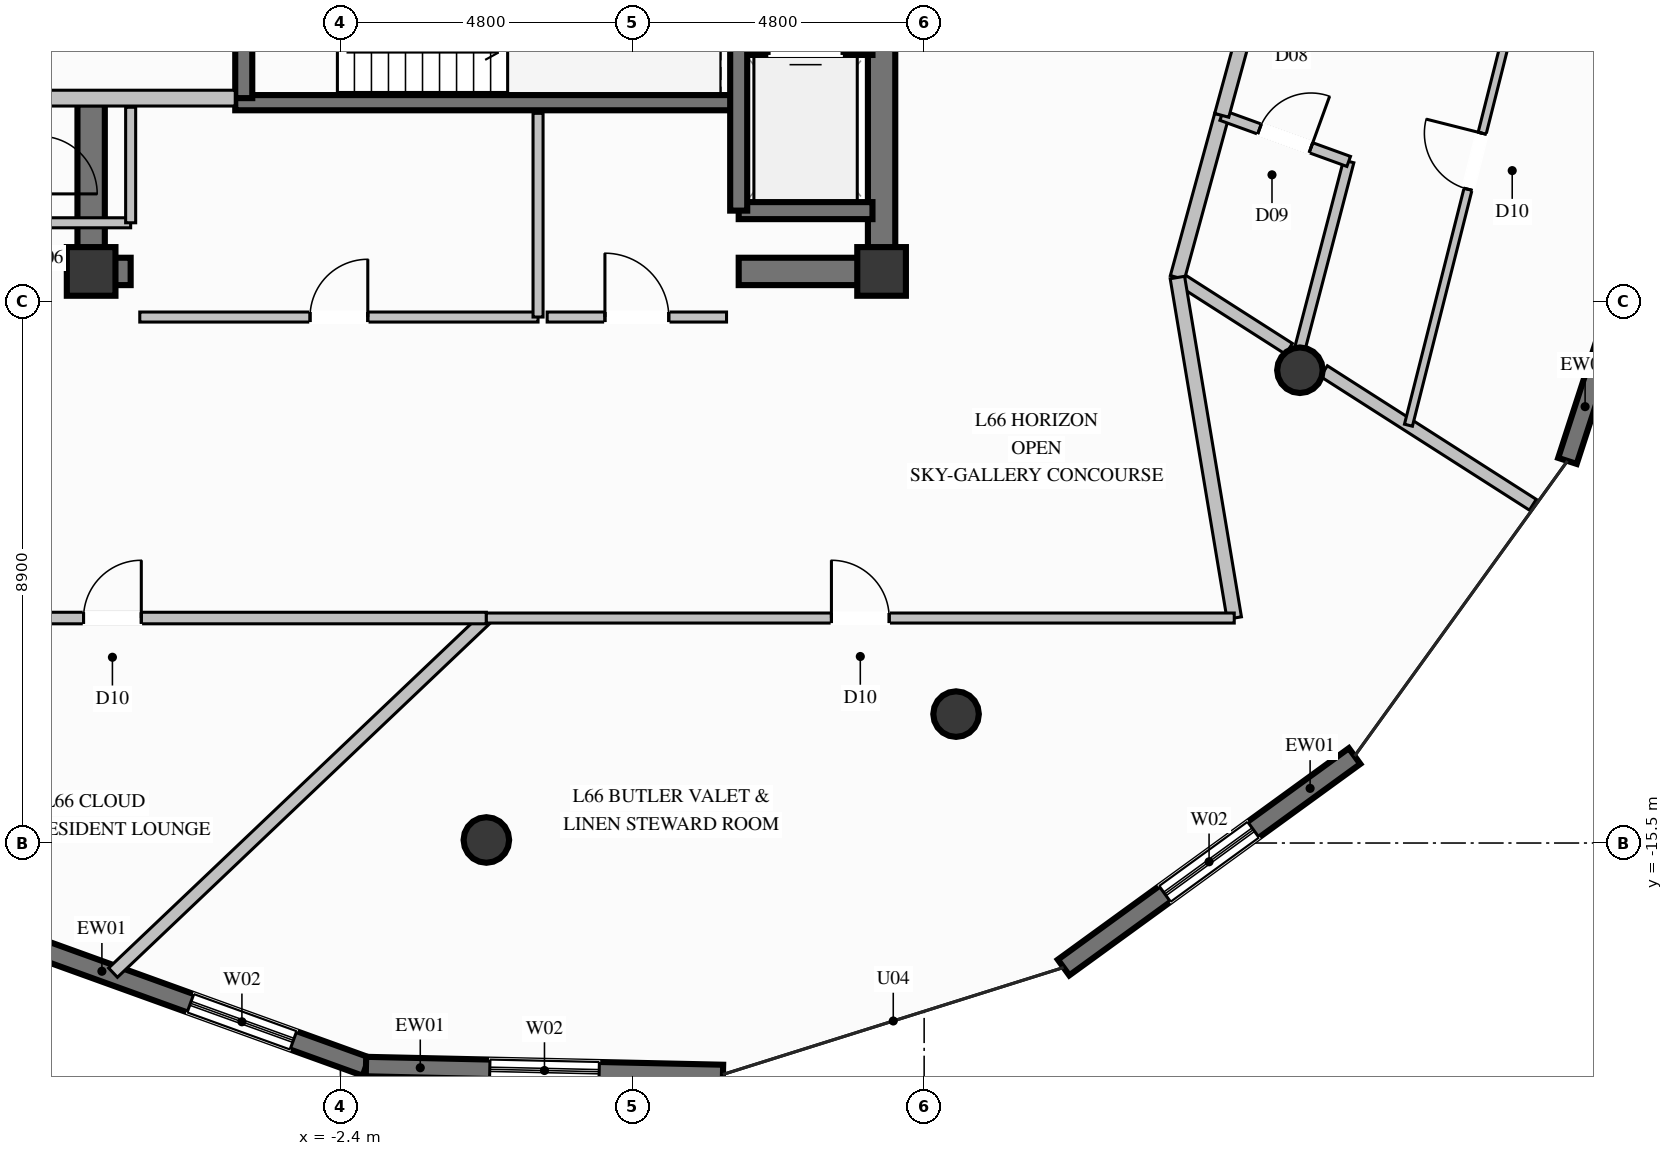
"""IFC4 building model, lengths in metres.
Left out: names, types, materials, properties, quantities, classifications, styles, units other than length and angle.
Written with IfcOpenShell. Run it as: python <this file> out.ifc"""

import sys

from ifc_helpers import new_model, si_unit, direction, frame, frame_2d, origin, origin_2d, place, context, subcontext, project, spatial, rectangle, circle, extrude, element, fill, save


model = new_model("IFC4")
c1 = context("Model", 3, precision=1e-05, world=origin(), true_north=direction((0.0, 1.0)))
c2 = subcontext(c1, "Body", "Model", "MODEL_VIEW")
j1 = project(units=[si_unit("LENGTHUNIT", "METRE"), si_unit("PLANEANGLEUNIT", "RADIAN")], contexts=[c1])
p1 = place(None, origin())
s1 = spatial("IfcSite", under=j1, at=p1, CompositionType="ELEMENT")
p2 = place(p1, origin())
s2 = spatial("IfcBuilding", under=s1, at=p2, CompositionType="ELEMENT")
p3 = place(p2, frame((0.0, 0.0, 254.4)))
s3 = spatial("IfcBuildingStorey", under=s2, at=p3, CompositionType="ELEMENT", Elevation=254.4)
for number, where, z_axis, x_axis in (
    (1, (-6.5, -6.1, 0.0), (0.0, 0.0, 1.0), (1.0, 0.0, 0.0)),
    (2, (6.5, -6.1, 0.0), (0.0, 0.0, 1.0), (1.0, 0.0, 0.0)),
):
    element("IfcColumn", number, at=place(p3, frame(where, z_axis=z_axis, x_axis=x_axis)), inside=s3, PredefinedType="COLUMN", context=c2, shape_type="SweptSolid", body=[
        extrude(rectangle(XDim=0.8, YDim=0.8, at=origin_2d()), origin(), (0.0, 0.0, 1.0), 3.8),
    ])
p4 = place(p3, frame((-4.13, -3.325, 0.0), z_axis=(0.0, 0.0, 1.0), x_axis=(1.0, 0.0, 0.0)))
e3 = element("IfcWall", 3, at=p4, inside=s3, PredefinedType="SOLIDWALL", context=c2, shape_type="SweptSolid", body=[
    extrude(rectangle(XDim=8.26, YDim=0.25, at=frame_2d((4.13, 0.0))), origin(), (0.0, 0.0, 1.0), 3.8),
])
p5 = place(p3, frame((-6.275, -6.1, 0.0), z_axis=(0.0, 0.0, 1.0), x_axis=(1.0, 0.0, 0.0)))
e4 = element("IfcWall", 4, at=p5, inside=s3, PredefinedType="SHEAR", context=c2, shape_type="SweptSolid", body=[
    extrude(rectangle(XDim=0.425, YDim=0.45, at=frame_2d((0.212, 0.0))), origin(), (0.0, 0.0, 1.0), 3.8),
])
p6 = place(p3, frame((4.15, -6.1, 0.0), z_axis=(0.0, 0.0, 1.0), x_axis=(1.0, 0.0, 0.0)))
e5 = element("IfcWall", 5, at=p6, inside=s3, PredefinedType="SHEAR", context=c2, shape_type="SweptSolid", body=[
    extrude(rectangle(XDim=2.125, YDim=0.45, at=frame_2d((1.062, 0.0))), origin(), (0.0, 0.0, 1.0), 3.8),
])
p7 = place(p3, frame((-6.5, -6.325, 0.0), z_axis=(0.0, 0.0, 1.0), x_axis=(0.0, 1.0, 0.0)))
e6 = element("IfcWall", 6, at=p7, inside=s3, PredefinedType="SHEAR", context=c2, shape_type="SweptSolid", body=[
    extrude(rectangle(XDim=2.975, YDim=0.45, at=frame_2d((1.487, 0.0))), origin(), (0.0, 0.0, 1.0), 3.8),
])
p8 = place(p3, frame((6.5, -6.325, 0.0), z_axis=(0.0, 0.0, 1.0), x_axis=(0.0, 1.0, 0.0)))
e7 = element("IfcWall", 7, at=p8, inside=s3, PredefinedType="SHEAR", context=c2, shape_type="SweptSolid", body=[
    extrude(rectangle(XDim=3.975, YDim=0.45, at=frame_2d((1.987, 0.0))), origin(), (0.0, 0.0, 1.0), 3.8),
])
for number, where, z_axis, x_axis in (
    (8, (0.0, -15.45, 0.0), (0.0, 0.0, 1.0), (1.0, 0.0, 0.0)),
    (9, (7.725, -13.38, 0.0), (0.0, 0.0, 1.0), (1.0, 0.0, 0.0)),
    (10, (13.38, -7.725, 0.0), (0.0, 0.0, 1.0), (1.0, 0.0, 0.0)),
):
    element("IfcColumn", number, at=place(p3, frame(where, z_axis=z_axis, x_axis=x_axis)), inside=s3, PredefinedType="COLUMN", context=c2, shape_type="SweptSolid", body=[
        extrude(circle(Radius=0.375, at=origin_2d()), origin(), (0.0, 0.0, 1.0), 3.8),
    ])
p9 = place(p3, frame((14.279, -14.07, 0.0), z_axis=(0.0, 0.0, 1.0), x_axis=(-0.809039360343, -0.587754466946, 0.0)))
e11 = element("IfcWall", 11, at=p9, inside=s3, PredefinedType="SOLIDWALL", context=c2, shape_type="SweptSolid", body=[
    extrude(rectangle(XDim=5.916, YDim=0.32, at=frame_2d((2.958, 0.0))), origin(), (0.0, 0.0, 1.0), 3.57),
])
p10 = place(p9, frame((2.058, 0.0, 0.35)))
e12 = element("IfcOpeningElement", 12, at=p10, cuts=e11, PredefinedType="OPENING", context=c2, shape_type="SweptSolid", body=[
    extrude(rectangle(XDim=1.8, YDim=2.6, at=frame_2d((0.9, 1.3))), frame((0.0, 0.17, 0.0), z_axis=(0.0, -1.0, 0.0), x_axis=(1.0, 0.0, 0.0)), (0.0, 0.0, 1.0), 0.34),
])
p11 = place(p3, frame((19.652, -3.46, 0.0), z_axis=(0.0, 0.0, 1.0), x_axis=(-0.30928580051, -0.950969133885, 0.0)))
e13 = element("IfcWall", 13, at=p11, inside=s3, PredefinedType="SOLIDWALL", context=c2, shape_type="SweptSolid", body=[
    extrude(rectangle(XDim=6.053, YDim=0.32, at=frame_2d((3.026, 0.0))), origin(), (0.0, 0.0, 1.0), 3.57),
])
p12 = place(p11, frame((2.126, 0.0, 0.35)))
e14 = element("IfcOpeningElement", 14, at=p12, cuts=e13, PredefinedType="OPENING", context=c2, shape_type="SweptSolid", body=[
    extrude(rectangle(XDim=1.8, YDim=2.6, at=frame_2d((0.9, 1.3))), frame((0.0, 0.17, 0.0), z_axis=(0.0, -1.0, 0.0), x_axis=(1.0, 0.0, 0.0)), (0.0, 0.0, 1.0), 0.34),
])
p13 = place(p3, frame((-1.98, -19.176, 0.0), z_axis=(0.0, 0.0, 1.0), x_axis=(-0.940616145843, 0.339472040349, 0.0)))
e15 = element("IfcWall", 15, at=p13, inside=s3, PredefinedType="SOLIDWALL", context=c2, shape_type="SweptSolid", body=[
    extrude(rectangle(XDim=5.915, YDim=0.32, at=frame_2d((2.958, 0.0))), origin(), (0.0, 0.0, 1.0), 3.57),
])
p14 = place(p13, frame((1.269, 0.0, 0.35)))
e16 = element("IfcOpeningElement", 16, at=p14, cuts=e15, PredefinedType="OPENING", context=c2, shape_type="SweptSolid", body=[
    extrude(rectangle(XDim=1.8, YDim=2.6, at=frame_2d((0.9, 1.3))), frame((0.0, 0.17, 0.0), z_axis=(0.0, -1.0, 0.0), x_axis=(1.0, 0.0, 0.0)), (0.0, 0.0, 1.0), 0.34),
])
p15 = place(p3, frame((3.891, -19.306, 0.0), z_axis=(0.0, 0.0, 1.0), x_axis=(-0.999755389007, 0.022117010435, 0.0)))
e17 = element("IfcWall", 17, at=p15, inside=s3, PredefinedType="SOLIDWALL", context=c2, shape_type="SweptSolid", body=[
    extrude(rectangle(XDim=5.873, YDim=0.32, at=frame_2d((2.936, 0.0))), origin(), (0.0, 0.0, 1.0), 3.57),
])
p16 = place(p15, frame((2.036, 0.0, 0.35)))
e18 = element("IfcOpeningElement", 18, at=p16, cuts=e17, PredefinedType="OPENING", context=c2, shape_type="SweptSolid", body=[
    extrude(rectangle(XDim=1.8, YDim=2.6, at=frame_2d((0.9, 1.3))), frame((0.0, 0.17, 0.0), z_axis=(0.0, -1.0, 0.0), x_axis=(1.0, 0.0, 0.0)), (0.0, 0.0, 1.0), 0.34),
])
p17 = place(p3, frame((4.15, -5.1, 0.0), z_axis=(0.0, 0.0, 1.0), x_axis=(1.0, 0.0, 0.0)))
e19 = element("IfcWall", 19, at=p17, inside=s3, PredefinedType="SOLIDWALL", context=c2, shape_type="SweptSolid", body=[
    extrude(rectangle(XDim=2.2, YDim=0.28, at=frame_2d((1.1, 0.0))), origin(), (0.0, 0.0, 1.0), 3.57),
])
p18 = place(p3, frame((6.35, -2.4, 0.0), z_axis=(0.0, 0.0, 1.0), x_axis=(-1.0, 0.0, 0.0)))
e20 = element("IfcWall", 20, at=p18, inside=s3, PredefinedType="SOLIDWALL", context=c2, shape_type="SweptSolid", body=[
    extrude(rectangle(XDim=2.2, YDim=0.28, at=frame_2d((1.1, 0.0))), origin(), (0.0, 0.0, 1.0), 3.57),
])
p19 = place(p18, frame((0.5, 0.0, 0.0)))
e21 = element("IfcOpeningElement", 21, at=p19, cuts=e20, PredefinedType="OPENING", context=c2, shape_type="SweptSolid", body=[
    extrude(rectangle(XDim=1.2, YDim=2.2, at=frame_2d((0.6, 1.1))), frame((0.0, 0.15, 0.0), z_axis=(0.0, -1.0, 0.0), x_axis=(1.0, 0.0, 0.0)), (0.0, 0.0, 1.0), 0.3),
])
p20 = place(p3, frame((4.15, -2.4, 0.0), z_axis=(0.0, 0.0, 1.0), x_axis=(0.0, -1.0, 0.0)))
e22 = element("IfcWall", 22, at=p20, inside=s3, PredefinedType="SOLIDWALL", context=c2, shape_type="SweptSolid", body=[
    extrude(rectangle(XDim=2.7, YDim=0.28, at=frame_2d((1.35, 0.0))), origin(), (0.0, 0.0, 1.0), 3.57),
])
p21 = place(p3, frame((-3.99, -3.25, 0.0), z_axis=(0.0, 0.0, 1.0), x_axis=(0.0, 1.0, 0.0)))
e23 = element("IfcWall", 23, at=p21, inside=s3, PredefinedType="SOLIDWALL", context=c2, shape_type="SweptSolid", body=[
    extrude(rectangle(XDim=5.46, YDim=0.28, at=frame_2d((2.73, 0.0))), origin(), (0.0, 0.0, 1.0), 3.57),
])
p22 = place(p21, frame((0.937, 0.0, 0.0)))
e24 = element("IfcOpeningElement", 24, at=p22, cuts=e23, PredefinedType="OPENING", context=c2, shape_type="SweptSolid", body=[
    extrude(rectangle(XDim=1.2, YDim=2.2, at=frame_2d((0.6, 1.1))), frame((0.0, 0.15, 0.0), z_axis=(0.0, -1.0, 0.0), x_axis=(1.0, 0.0, 0.0)), (0.0, 0.0, 1.0), 0.3),
])
p23 = place(p3, frame((-7.225, -3.25, 0.0), z_axis=(0.0, 0.0, 1.0), x_axis=(1.0, 0.0, 0.0)))
e25 = element("IfcWall", 25, at=p23, inside=s3, PredefinedType="PARTITIONING", context=c2, shape_type="SweptSolid", body=[
    extrude(rectangle(XDim=3.095, YDim=0.26, at=frame_2d((1.548, 0.0))), origin(), (0.0, 0.0, 1.0), 3.57),
])
p24 = place(p3, frame((-7.35, -5.3, 0.0), z_axis=(0.0, 0.0, 1.0), x_axis=(1.0, 0.0, 0.0)))
e26 = element("IfcWall", 26, at=p24, inside=s3, PredefinedType="PARTITIONING", context=c2, shape_type="SweptSolid", body=[
    extrude(rectangle(XDim=1.5, YDim=0.165, at=frame_2d((0.75, 0.0))), origin(), (0.0, 0.0, 1.0), 2.655),
])
p25 = place(p3, frame((-5.85, -5.3, 0.0), z_axis=(0.0, 0.0, 1.0), x_axis=(0.0, 1.0, 0.0)))
e27 = element("IfcWall", 27, at=p25, inside=s3, PredefinedType="PARTITIONING", context=c2, shape_type="SweptSolid", body=[
    extrude(rectangle(XDim=1.9, YDim=0.165, at=frame_2d((0.95, 0.0))), origin(), (0.0, 0.0, 1.0), 2.655),
])
p26 = place(p3, frame((-5.7, -6.85, 0.0), z_axis=(0.0, 0.0, 1.0), x_axis=(1.0, 0.0, 0.0)))
e28 = element("IfcWall", 28, at=p26, inside=s3, PredefinedType="PARTITIONING", context=c2, shape_type="SweptSolid", body=[
    extrude(rectangle(XDim=6.55, YDim=0.165, at=frame_2d((3.275, 0.0))), origin(), (0.0, 0.0, 1.0), 2.655),
])
p27 = place(p26, frame((2.8, 0.0, 0.0)))
e29 = element("IfcOpeningElement", 29, at=p27, cuts=e28, PredefinedType="OPENING", context=c2, shape_type="SweptSolid", body=[
    extrude(rectangle(XDim=0.95, YDim=2.1, at=frame_2d((0.475, 1.05))), frame((0.0, 0.093, 0.0), z_axis=(0.0, -1.0, 0.0), x_axis=(1.0, 0.0, 0.0)), (0.0, 0.0, 1.0), 0.185),
])
p28 = place(p3, frame((0.85, -6.85, 0.0), z_axis=(0.0, 0.0, 1.0), x_axis=(0.0, 1.0, 0.0)))
e30 = element("IfcWall", 30, at=p28, inside=s3, PredefinedType="PARTITIONING", context=c2, shape_type="SweptSolid", body=[
    extrude(rectangle(XDim=3.35, YDim=0.165, at=frame_2d((1.675, 0.0))), origin(), (0.0, 0.0, 1.0), 3.57),
])
p29 = place(p3, frame((1.0, -6.85, 0.0), z_axis=(0.0, 0.0, 1.0), x_axis=(1.0, 0.0, 0.0)))
e31 = element("IfcWall", 31, at=p29, inside=s3, PredefinedType="PARTITIONING", context=c2, shape_type="SweptSolid", body=[
    extrude(rectangle(XDim=2.95, YDim=0.165, at=frame_2d((1.475, 0.0))), origin(), (0.0, 0.0, 1.0), 2.655),
])
p30 = place(p29, frame((0.95, 0.0, 0.0)))
e32 = element("IfcOpeningElement", 32, at=p30, cuts=e31, PredefinedType="OPENING", context=c2, shape_type="SweptSolid", body=[
    extrude(rectangle(XDim=1.05, YDim=2.15, at=frame_2d((0.525, 1.075))), frame((0.0, 0.093, 0.0), z_axis=(0.0, -1.0, 0.0), x_axis=(1.0, 0.0, 0.0)), (0.0, 0.0, 1.0), 0.185),
])
p31 = place(p3, frame((11.365, -6.2, 0.0), z_axis=(0.0, 0.0, 1.0), x_axis=(0.842537994554, -0.538636916422, 0.0)))
e33 = element("IfcWall", 33, at=p31, inside=s3, PredefinedType="PARTITIONING", context=c2, shape_type="SweptSolid", body=[
    extrude(rectangle(XDim=2.178, YDim=0.21, at=frame_2d((1.089, 0.0))), origin(), (0.0, 0.0, 1.0), 3.011),
])
p32 = place(p3, frame((13.775, -7.74, 0.0), z_axis=(0.0, 0.0, 1.0), x_axis=(0.842498543439, -0.538698621033, 0.0)))
e34 = element("IfcWall", 34, at=p32, inside=s3, PredefinedType="PARTITIONING", context=c2, shape_type="SweptSolid", body=[
    extrude(rectangle(XDim=4.078, YDim=0.21, at=frame_2d((2.039, 0.0))), origin(), (0.0, 0.0, 1.0), 3.57),
])
p33 = place(p3, frame((11.365, -6.2, 0.0), z_axis=(0.0, 0.0, 1.0), x_axis=(0.263670269996, 0.964612869871, 0.0)))
e35 = element("IfcWall", 35, at=p33, inside=s3, PredefinedType="PARTITIONING", context=c2, shape_type="SweptSolid", body=[
    extrude(rectangle(XDim=2.765, YDim=0.24, at=frame_2d((1.382, 0.0))), origin(), (0.0, 0.0, 1.0), 3.57),
])
p34 = place(p3, frame((13.353, -7.471, 0.0), z_axis=(0.0, 0.0, 1.0), x_axis=(0.252225310896, 0.967668534439, 0.0)))
e36 = element("IfcWall", 36, at=p34, inside=s3, PredefinedType="PLUMBINGWALL", context=c2, shape_type="SweptSolid", body=[
    extrude(rectangle(XDim=3.286, YDim=0.175, at=frame_2d((1.643, 0.0))), origin(), (0.0, 0.0, 1.0), 3.138),
])
p35 = place(p3, frame((12.094, -3.533, 0.0), z_axis=(0.0, 0.0, 1.0), x_axis=(0.93996338917, -0.341275295062, 0.0)))
e37 = element("IfcWall", 37, at=p35, inside=s3, PredefinedType="PLUMBINGWALL", context=c2, shape_type="SweptSolid", body=[
    extrude(rectangle(XDim=2.221, YDim=0.175, at=frame_2d((1.111, 0.0))), origin(), (0.0, 0.0, 1.0), 3.57),
])
p36 = place(p35, frame((0.661, 0.0, 0.0)))
e38 = element("IfcOpeningElement", 38, at=p36, cuts=e37, PredefinedType="OPENING", context=c2, shape_type="SweptSolid", body=[
    extrude(rectangle(XDim=0.9, YDim=2.1, at=frame_2d((0.45, 1.05))), frame((0.0, 0.098, 0.0), z_axis=(0.0, -1.0, 0.0), x_axis=(1.0, 0.0, 0.0)), (0.0, 0.0, 1.0), 0.195),
])
p37 = place(p3, frame((12.094, -3.533, 0.0), z_axis=(0.0, 0.0, 1.0), x_axis=(0.263528615014, 0.964651579104, 0.0)))
e39 = element("IfcWall", 39, at=p37, inside=s3, PredefinedType="PARTITIONING", context=c2, shape_type="SweptSolid", body=[
    extrude(rectangle(XDim=3.818, YDim=0.24, at=frame_2d((1.909, 0.0))), origin(), (0.0, 0.0, 1.0), 3.57),
])
p38 = place(p37, frame((1.359, 0.0, 0.0)))
e40 = element("IfcOpeningElement", 40, at=p38, cuts=e39, PredefinedType="OPENING", context=c2, shape_type="SweptSolid", body=[
    extrude(rectangle(XDim=1.1, YDim=2.3, at=frame_2d((0.55, 1.15))), frame((0.0, 0.13, 0.0), z_axis=(0.0, -1.0, 0.0), x_axis=(1.0, 0.0, 0.0)), (0.0, 0.0, 1.0), 0.26),
])
p39 = place(p3, frame((15.165, -8.629, 0.0), z_axis=(0.0, 0.0, 1.0), x_axis=(0.244710102304, 0.969596290128, 0.0)))
e41 = element("IfcWall", 41, at=p39, inside=s3, PredefinedType="PARTITIONING", context=c2, shape_type="SweptSolid", body=[
    extrude(rectangle(XDim=8.953, YDim=0.135, at=frame_2d((4.477, 0.0))), origin(), (0.0, 0.0, 1.0), 3.57),
])
p40 = place(p39, frame((4.002, 0.0, 0.0)))
e42 = element("IfcOpeningElement", 42, at=p40, cuts=e41, PredefinedType="OPENING", context=c2, shape_type="SweptSolid", body=[
    extrude(rectangle(XDim=0.95, YDim=2.1, at=frame_2d((0.475, 1.05))), frame((0.0, 0.078, 0.0), z_axis=(0.0, -1.0, 0.0), x_axis=(1.0, 0.0, 0.0)), (0.0, 0.0, 1.0), 0.155),
])
p41 = place(p3, frame((0.0, -11.8, 0.0), z_axis=(0.0, 0.0, 1.0), x_axis=(-0.725050537947, -0.688695663862, 0.0)))
e43 = element("IfcWall", 43, at=p41, inside=s3, PredefinedType="PARTITIONING", context=c2, shape_type="SweptSolid", body=[
    extrude(rectangle(XDim=8.468, YDim=0.21, at=frame_2d((4.234, 0.0))), origin(), (0.0, 0.0, 1.0), 3.57),
])
p42 = place(p3, frame((-12.3, -11.8, 0.0), z_axis=(0.0, 0.0, 1.0), x_axis=(1.0, 0.0, 0.0)))
e44 = element("IfcWall", 44, at=p42, inside=s3, PredefinedType="PARTITIONING", context=c2, shape_type="SweptSolid", body=[
    extrude(rectangle(XDim=12.3, YDim=0.19, at=frame_2d((6.15, 0.0))), origin(), (0.0, 0.0, 1.0), 3.57),
])
p43 = place(p42, frame((5.675, 0.0, 0.0)))
e45 = element("IfcOpeningElement", 45, at=p43, cuts=e44, PredefinedType="OPENING", context=c2, shape_type="SweptSolid", body=[
    extrude(rectangle(XDim=0.95, YDim=2.1, at=frame_2d((0.475, 1.05))), frame((0.0, 0.105, 0.0), z_axis=(0.0, -1.0, 0.0), x_axis=(1.0, 0.0, 0.0)), (0.0, 0.0, 1.0), 0.21),
])
p44 = place(p3, frame((12.3, -11.8, 0.0), z_axis=(0.0, 0.0, 1.0), x_axis=(-0.164691848211, 0.986345068996, 0.0)))
e46 = element("IfcWall", 46, at=p44, inside=s3, PredefinedType="PARTITIONING", context=c2, shape_type="SweptSolid", body=[
    extrude(rectangle(XDim=5.678, YDim=0.24, at=frame_2d((2.839, 0.0))), origin(), (0.0, 0.0, 1.0), 3.57),
])
p45 = place(p3, frame((0.0, -11.8, 0.0), z_axis=(0.0, 0.0, 1.0), x_axis=(1.0, 0.0, 0.0)))
e47 = element("IfcWall", 47, at=p45, inside=s3, PredefinedType="PARTITIONING", context=c2, shape_type="SweptSolid", body=[
    extrude(rectangle(XDim=12.3, YDim=0.165, at=frame_2d((6.15, 0.0))), origin(), (0.0, 0.0, 1.0), 3.57),
])
p46 = place(p45, frame((5.675, 0.0, 0.0)))
e48 = element("IfcOpeningElement", 48, at=p46, cuts=e47, PredefinedType="OPENING", context=c2, shape_type="SweptSolid", body=[
    extrude(rectangle(XDim=0.95, YDim=2.1, at=frame_2d((0.475, 1.05))), frame((0.0, 0.093, 0.0), z_axis=(0.0, -1.0, 0.0), x_axis=(1.0, 0.0, 0.0)), (0.0, 0.0, 1.0), 0.185),
])
p47 = place(p10, origin())
e49 = element("IfcWindow", 49, at=p47, inside=s3, PartitioningType="SINGLE_PANEL", PredefinedType="WINDOW", context=c2, shape_type="SweptSolid", body=[
    extrude(rectangle(XDim=1.8, YDim=2.6, at=frame_2d((0.9, 1.3))), frame((0.0, 0.03, 0.0), z_axis=(0.0, -1.0, 0.0), x_axis=(1.0, 0.0, 0.0)), (0.0, 0.0, 1.0), 0.06),
])
fill(e12, e49)
p48 = place(p14, origin())
e50 = element("IfcWindow", 50, at=p48, inside=s3, PartitioningType="SINGLE_PANEL", PredefinedType="WINDOW", context=c2, shape_type="SweptSolid", body=[
    extrude(rectangle(XDim=1.8, YDim=2.6, at=frame_2d((0.9, 1.3))), frame((0.0, 0.03, 0.0), z_axis=(0.0, -1.0, 0.0), x_axis=(1.0, 0.0, 0.0)), (0.0, 0.0, 1.0), 0.06),
])
fill(e16, e50)
p49 = place(p16, origin())
e51 = element("IfcWindow", 51, at=p49, inside=s3, PartitioningType="SINGLE_PANEL", PredefinedType="WINDOW", context=c2, shape_type="SweptSolid", body=[
    extrude(rectangle(XDim=1.8, YDim=2.6, at=frame_2d((0.9, 1.3))), frame((0.0, 0.03, 0.0), z_axis=(0.0, -1.0, 0.0), x_axis=(1.0, 0.0, 0.0)), (0.0, 0.0, 1.0), 0.06),
])
fill(e18, e51)
p50 = place(p27, origin())
e52 = element("IfcDoor", 52, at=p50, inside=s3, OperationType="SINGLE_SWING_RIGHT", PredefinedType="DOOR", context=c2, shape_type="SweptSolid", body=[
    extrude(rectangle(XDim=0.95, YDim=2.1, at=frame_2d((0.475, 1.05))), frame((0.0, 0.025, 0.0), z_axis=(0.0, -1.0, 0.0), x_axis=(1.0, 0.0, 0.0)), (0.0, 0.0, 1.0), 0.05),
])
fill(e29, e52)
p51 = place(p30, origin())
e53 = element("IfcDoor", 53, at=p51, inside=s3, OperationType="SINGLE_SWING_LEFT", PredefinedType="DOOR", context=c2, shape_type="SweptSolid", body=[
    extrude(rectangle(XDim=1.05, YDim=2.15, at=frame_2d((0.525, 1.075))), frame((0.0, 0.025, 0.0), z_axis=(0.0, -1.0, 0.0), x_axis=(1.0, 0.0, 0.0)), (0.0, 0.0, 1.0), 0.05),
])
fill(e32, e53)
p52 = place(p36, origin())
e54 = element("IfcDoor", 54, at=p52, inside=s3, OperationType="SINGLE_SWING_RIGHT", PredefinedType="DOOR", context=c2, shape_type="SweptSolid", body=[
    extrude(rectangle(XDim=0.9, YDim=2.1, at=frame_2d((0.45, 1.05))), frame((0.0, 0.025, 0.0), z_axis=(0.0, -1.0, 0.0), x_axis=(1.0, 0.0, 0.0)), (0.0, 0.0, 1.0), 0.05),
])
fill(e38, e54)
p53 = place(p40, origin())
e55 = element("IfcDoor", 55, at=p53, inside=s3, OperationType="SINGLE_SWING_RIGHT", PredefinedType="DOOR", context=c2, shape_type="SweptSolid", body=[
    extrude(rectangle(XDim=0.95, YDim=2.1, at=frame_2d((0.475, 1.05))), frame((0.0, 0.025, 0.0), z_axis=(0.0, -1.0, 0.0), x_axis=(1.0, 0.0, 0.0)), (0.0, 0.0, 1.0), 0.05),
])
fill(e42, e55)
p54 = place(p43, origin())
e56 = element("IfcDoor", 56, at=p54, inside=s3, OperationType="SINGLE_SWING_RIGHT", PredefinedType="DOOR", context=c2, shape_type="SweptSolid", body=[
    extrude(rectangle(XDim=0.95, YDim=2.1, at=frame_2d((0.475, 1.05))), frame((0.0, 0.025, 0.0), z_axis=(0.0, -1.0, 0.0), x_axis=(1.0, 0.0, 0.0)), (0.0, 0.0, 1.0), 0.05),
])
fill(e45, e56)
p55 = place(p46, origin())
e57 = element("IfcDoor", 57, at=p55, inside=s3, OperationType="SINGLE_SWING_LEFT", PredefinedType="DOOR", context=c2, shape_type="SweptSolid", body=[
    extrude(rectangle(XDim=0.95, YDim=2.1, at=frame_2d((0.475, 1.05))), frame((0.0, 0.025, 0.0), z_axis=(0.0, -1.0, 0.0), x_axis=(1.0, 0.0, 0.0)), (0.0, 0.0, 1.0), 0.05),
])
fill(e48, e57)
save(model, sys.argv[1])
